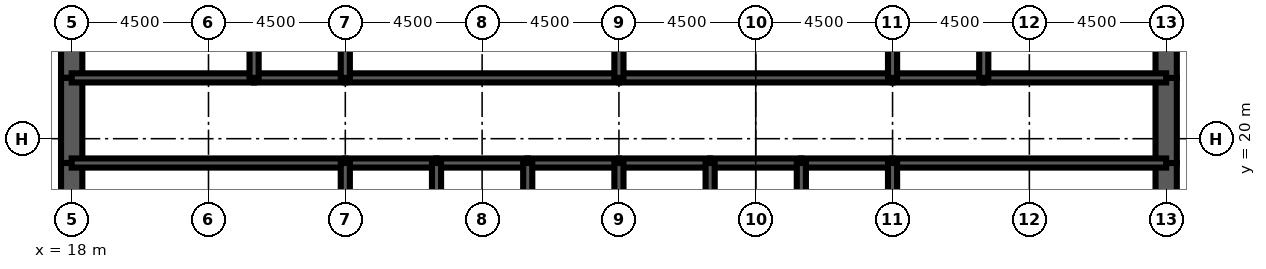
"""IFC4 building model, lengths in metres.
Left out: names, types, materials, properties, quantities, classifications, styles, units other than length and angle.
Written with IfcOpenShell. Run it as: python <this file> out.ifc"""

import sys

from ifc_helpers import new_model, si_unit, direction, frame, frame_2d, origin, place, context, subcontext, project, spatial, rectangle, extrude, element, fill, save


model = new_model("IFC4")
c1 = context("Model", 3, precision=1e-05, world=origin(), true_north=direction((0.0, 1.0)))
c2 = subcontext(c1, "Body", "Model", "MODEL_VIEW")
j1 = project(units=[si_unit("LENGTHUNIT", "METRE"), si_unit("PLANEANGLEUNIT", "RADIAN")], contexts=[c1])
p1 = place(None, origin())
s1 = spatial("IfcSite", under=j1, at=p1, CompositionType="ELEMENT")
p2 = place(p1, origin())
s2 = spatial("IfcBuilding", under=s1, at=p2, CompositionType="ELEMENT")
p3 = place(p2, frame((0.0, 0.0, 329.9)))
s3 = spatial("IfcBuildingStorey", under=s2, at=p3, CompositionType="ELEMENT", Elevation=329.9)
p4 = place(p3, frame((18.0, 26.0, 0.0), z_axis=(0.0, 0.0, 1.0), x_axis=(0.0, -1.0, 0.0)))
e1 = element("IfcWall", 1, at=p4, inside=s3, PredefinedType="SHEAR", context=c2, shape_type="SweptSolid", body=[
    extrude(rectangle(XDim=4.0, YDim=0.7, at=frame_2d((2.0, 0.0))), origin(), (0.0, 0.0, 1.0), 4.2),
])
p5 = place(p3, frame((18.0, 22.0, 0.0), z_axis=(0.0, 0.0, 1.0), x_axis=(0.0, -1.0, 0.0)))
e2 = element("IfcWall", 2, at=p5, inside=s3, PredefinedType="SHEAR", context=c2, shape_type="SweptSolid", body=[
    extrude(rectangle(XDim=2.8, YDim=0.7, at=frame_2d((1.4, 0.0))), origin(), (0.0, 0.0, 1.0), 4.2),
])
p6 = place(p5, frame((0.6, 0.0, 0.0)))
e3 = element("IfcOpeningElement", 3, at=p6, cuts=e2, PredefinedType="OPENING", context=c2, shape_type="SweptSolid", body=[
    extrude(rectangle(XDim=1.8, YDim=2.1, at=frame_2d((0.9, 1.05))), frame((0.0, 0.36, 0.0), z_axis=(0.0, -1.0, 0.0), x_axis=(1.0, 0.0, 0.0)), (0.0, 0.0, 1.0), 0.72),
])
for number, where, z_axis, x_axis in (
    (4, (18.0, 19.2, 0.0), (0.0, 0.0, 1.0), (0.0, -1.0, 0.0)),
    (5, (54.0, 16.0, 0.0), (0.0, 0.0, 1.0), (0.0, 1.0, 0.0)),
):
    element("IfcWall", number, at=place(p3, frame(where, z_axis=z_axis, x_axis=x_axis)), inside=s3, PredefinedType="SHEAR", context=c2, shape_type="SweptSolid", body=[
        extrude(rectangle(XDim=3.2, YDim=0.7, at=frame_2d((1.6, 0.0))), origin(), (0.0, 0.0, 1.0), 4.2),
    ])
p7 = place(p3, frame((54.0, 19.2, 0.0), z_axis=(0.0, 0.0, 1.0), x_axis=(0.0, 1.0, 0.0)))
e6 = element("IfcWall", 6, at=p7, inside=s3, PredefinedType="SHEAR", context=c2, shape_type="SweptSolid", body=[
    extrude(rectangle(XDim=2.8, YDim=0.7, at=frame_2d((1.4, 0.0))), origin(), (0.0, 0.0, 1.0), 4.2),
])
p8 = place(p7, frame((0.4, 0.0, 0.0)))
e7 = element("IfcOpeningElement", 7, at=p8, cuts=e6, PredefinedType="OPENING", context=c2, shape_type="SweptSolid", body=[
    extrude(rectangle(XDim=1.8, YDim=2.1, at=frame_2d((0.9, 1.05))), frame((0.0, 0.36, 0.0), z_axis=(0.0, -1.0, 0.0), x_axis=(1.0, 0.0, 0.0)), (0.0, 0.0, 1.0), 0.72),
])
p9 = place(p3, frame((54.0, 22.0, 0.0), z_axis=(0.0, 0.0, 1.0), x_axis=(0.0, 1.0, 0.0)))
e8 = element("IfcWall", 8, at=p9, inside=s3, PredefinedType="SHEAR", context=c2, shape_type="SweptSolid", body=[
    extrude(rectangle(XDim=4.0, YDim=0.7, at=frame_2d((2.0, 0.0))), origin(), (0.0, 0.0, 1.0), 4.2),
])
p10 = place(p3, frame((18.0, 19.2, 0.0), z_axis=(0.0, 0.0, 1.0), x_axis=(1.0, 0.0, 0.0)))
e9 = element("IfcWall", 9, at=p10, inside=s3, PredefinedType="SOLIDWALL", context=c2, shape_type="SweptSolid", body=[
    extrude(rectangle(XDim=9.0, YDim=0.3, at=frame_2d((4.5, 0.0))), origin(), (0.0, 0.0, 1.0), 4.2),
])
p11 = place(p10, frame((0.65, 0.0, 0.0)))
e10 = element("IfcOpeningElement", 10, at=p11, cuts=e9, PredefinedType="OPENING", context=c2, shape_type="SweptSolid", body=[
    extrude(rectangle(XDim=1.0, YDim=2.1, at=frame_2d((0.5, 1.05))), frame((0.0, 0.16, 0.0), z_axis=(0.0, -1.0, 0.0), x_axis=(1.0, 0.0, 0.0)), (0.0, 0.0, 1.0), 0.32),
])
p12 = place(p3, frame((27.0, 19.2, 0.0), z_axis=(0.0, 0.0, 1.0), x_axis=(1.0, 0.0, 0.0)))
e11 = element("IfcWall", 11, at=p12, inside=s3, PredefinedType="SOLIDWALL", context=c2, shape_type="SweptSolid", body=[
    extrude(rectangle(XDim=3.0, YDim=0.3, at=frame_2d((1.5, 0.0))), origin(), (0.0, 0.0, 1.0), 4.2),
])
p13 = place(p12, frame((0.95, 0.0, 0.0)))
e12 = element("IfcOpeningElement", 12, at=p13, cuts=e11, PredefinedType="OPENING", context=c2, shape_type="SweptSolid", body=[
    extrude(rectangle(XDim=1.1, YDim=2.2, at=frame_2d((0.55, 1.1))), frame((0.0, 0.16, 0.0), z_axis=(0.0, -1.0, 0.0), x_axis=(1.0, 0.0, 0.0)), (0.0, 0.0, 1.0), 0.32),
])
p14 = place(p3, frame((30.0, 19.2, 0.0), z_axis=(0.0, 0.0, 1.0), x_axis=(1.0, 0.0, 0.0)))
e13 = element("IfcWall", 13, at=p14, inside=s3, PredefinedType="SOLIDWALL", context=c2, shape_type="SweptSolid", body=[
    extrude(rectangle(XDim=3.0, YDim=0.3, at=frame_2d((1.5, 0.0))), origin(), (0.0, 0.0, 1.0), 4.2),
])
p15 = place(p14, frame((0.95, 0.0, 0.0)))
e14 = element("IfcOpeningElement", 14, at=p15, cuts=e13, PredefinedType="OPENING", context=c2, shape_type="SweptSolid", body=[
    extrude(rectangle(XDim=1.1, YDim=2.2, at=frame_2d((0.55, 1.1))), frame((0.0, 0.16, 0.0), z_axis=(0.0, -1.0, 0.0), x_axis=(1.0, 0.0, 0.0)), (0.0, 0.0, 1.0), 0.32),
])
p16 = place(p3, frame((33.0, 19.2, 0.0), z_axis=(0.0, 0.0, 1.0), x_axis=(1.0, 0.0, 0.0)))
e15 = element("IfcWall", 15, at=p16, inside=s3, PredefinedType="SOLIDWALL", context=c2, shape_type="SweptSolid", body=[
    extrude(rectangle(XDim=3.0, YDim=0.3, at=frame_2d((1.5, 0.0))), origin(), (0.0, 0.0, 1.0), 4.2),
])
p17 = place(p16, frame((0.95, 0.0, 0.0)))
e16 = element("IfcOpeningElement", 16, at=p17, cuts=e15, PredefinedType="OPENING", context=c2, shape_type="SweptSolid", body=[
    extrude(rectangle(XDim=1.1, YDim=2.2, at=frame_2d((0.55, 1.1))), frame((0.0, 0.16, 0.0), z_axis=(0.0, -1.0, 0.0), x_axis=(1.0, 0.0, 0.0)), (0.0, 0.0, 1.0), 0.32),
])
p18 = place(p3, frame((36.0, 19.2, 0.0), z_axis=(0.0, 0.0, 1.0), x_axis=(1.0, 0.0, 0.0)))
e17 = element("IfcWall", 17, at=p18, inside=s3, PredefinedType="SOLIDWALL", context=c2, shape_type="SweptSolid", body=[
    extrude(rectangle(XDim=3.0, YDim=0.3, at=frame_2d((1.5, 0.0))), origin(), (0.0, 0.0, 1.0), 4.2),
])
p19 = place(p18, frame((0.95, 0.0, 0.0)))
e18 = element("IfcOpeningElement", 18, at=p19, cuts=e17, PredefinedType="OPENING", context=c2, shape_type="SweptSolid", body=[
    extrude(rectangle(XDim=1.1, YDim=2.2, at=frame_2d((0.55, 1.1))), frame((0.0, 0.16, 0.0), z_axis=(0.0, -1.0, 0.0), x_axis=(1.0, 0.0, 0.0)), (0.0, 0.0, 1.0), 0.32),
])
p20 = place(p3, frame((39.0, 19.2, 0.0), z_axis=(0.0, 0.0, 1.0), x_axis=(1.0, 0.0, 0.0)))
e19 = element("IfcWall", 19, at=p20, inside=s3, PredefinedType="SOLIDWALL", context=c2, shape_type="SweptSolid", body=[
    extrude(rectangle(XDim=3.0, YDim=0.3, at=frame_2d((1.5, 0.0))), origin(), (0.0, 0.0, 1.0), 4.2),
])
p21 = place(p20, frame((1.0, 0.0, 0.0)))
e20 = element("IfcOpeningElement", 20, at=p21, cuts=e19, PredefinedType="OPENING", context=c2, shape_type="SweptSolid", body=[
    extrude(rectangle(XDim=1.0, YDim=2.1, at=frame_2d((0.5, 1.05))), frame((0.0, 0.16, 0.0), z_axis=(0.0, -1.0, 0.0), x_axis=(1.0, 0.0, 0.0)), (0.0, 0.0, 1.0), 0.32),
])
p22 = place(p3, frame((42.0, 19.2, 0.0), z_axis=(0.0, 0.0, 1.0), x_axis=(1.0, 0.0, 0.0)))
e21 = element("IfcWall", 21, at=p22, inside=s3, PredefinedType="SOLIDWALL", context=c2, shape_type="SweptSolid", body=[
    extrude(rectangle(XDim=3.0, YDim=0.3, at=frame_2d((1.5, 0.0))), origin(), (0.0, 0.0, 1.0), 4.2),
])
p23 = place(p22, frame((1.0, 0.0, 0.0)))
e22 = element("IfcOpeningElement", 22, at=p23, cuts=e21, PredefinedType="OPENING", context=c2, shape_type="SweptSolid", body=[
    extrude(rectangle(XDim=1.0, YDim=2.1, at=frame_2d((0.5, 1.05))), frame((0.0, 0.16, 0.0), z_axis=(0.0, -1.0, 0.0), x_axis=(1.0, 0.0, 0.0)), (0.0, 0.0, 1.0), 0.32),
])
p24 = place(p3, frame((45.0, 19.2, 0.0), z_axis=(0.0, 0.0, 1.0), x_axis=(1.0, 0.0, 0.0)))
e23 = element("IfcWall", 23, at=p24, inside=s3, PredefinedType="SOLIDWALL", context=c2, shape_type="SweptSolid", body=[
    extrude(rectangle(XDim=9.0, YDim=0.3, at=frame_2d((4.5, 0.0))), origin(), (0.0, 0.0, 1.0), 4.2),
])
p25 = place(p24, frame((7.35, 0.0, 0.0)))
e24 = element("IfcOpeningElement", 24, at=p25, cuts=e23, PredefinedType="OPENING", context=c2, shape_type="SweptSolid", body=[
    extrude(rectangle(XDim=1.0, YDim=2.1, at=frame_2d((0.5, 1.05))), frame((0.0, 0.16, 0.0), z_axis=(0.0, -1.0, 0.0), x_axis=(1.0, 0.0, 0.0)), (0.0, 0.0, 1.0), 0.32),
])
p26 = place(p3, frame((18.0, 22.0, 0.0), z_axis=(0.0, 0.0, 1.0), x_axis=(1.0, 0.0, 0.0)))
e25 = element("IfcWall", 25, at=p26, inside=s3, PredefinedType="SOLIDWALL", context=c2, shape_type="SweptSolid", body=[
    extrude(rectangle(XDim=6.0, YDim=0.3, at=frame_2d((3.0, 0.0))), origin(), (0.0, 0.0, 1.0), 4.2),
])
p27 = place(p26, frame((4.4, 0.0, 0.0)))
e26 = element("IfcOpeningElement", 26, at=p27, cuts=e25, PredefinedType="OPENING", context=c2, shape_type="SweptSolid", body=[
    extrude(rectangle(XDim=1.0, YDim=2.1, at=frame_2d((0.5, 1.05))), frame((0.0, 0.16, 0.0), z_axis=(0.0, -1.0, 0.0), x_axis=(1.0, 0.0, 0.0)), (0.0, 0.0, 1.0), 0.32),
])
p28 = place(p26, frame((0.9, 0.0, 0.0)))
e27 = element("IfcOpeningElement", 27, at=p28, cuts=e25, PredefinedType="OPENING", context=c2, shape_type="SweptSolid", body=[
    extrude(rectangle(XDim=1.0, YDim=2.1, at=frame_2d((0.5, 1.05))), frame((0.0, 0.16, 0.0), z_axis=(0.0, -1.0, 0.0), x_axis=(1.0, 0.0, 0.0)), (0.0, 0.0, 1.0), 0.32),
])
p29 = place(p3, frame((24.0, 22.0, 0.0), z_axis=(0.0, 0.0, 1.0), x_axis=(1.0, 0.0, 0.0)))
e28 = element("IfcWall", 28, at=p29, inside=s3, PredefinedType="SOLIDWALL", context=c2, shape_type="SweptSolid", body=[
    extrude(rectangle(XDim=3.0, YDim=0.3, at=frame_2d((1.5, 0.0))), origin(), (0.0, 0.0, 1.0), 4.2),
])
p30 = place(p29, frame((1.0, 0.0, 0.0)))
e29 = element("IfcOpeningElement", 29, at=p30, cuts=e28, PredefinedType="OPENING", context=c2, shape_type="SweptSolid", body=[
    extrude(rectangle(XDim=1.0, YDim=2.1, at=frame_2d((0.5, 1.05))), frame((0.0, 0.16, 0.0), z_axis=(0.0, -1.0, 0.0), x_axis=(1.0, 0.0, 0.0)), (0.0, 0.0, 1.0), 0.32),
])
p31 = place(p3, frame((27.0, 22.0, 0.0), z_axis=(0.0, 0.0, 1.0), x_axis=(1.0, 0.0, 0.0)))
e30 = element("IfcWall", 30, at=p31, inside=s3, PredefinedType="SOLIDWALL", context=c2, shape_type="SweptSolid", body=[
    extrude(rectangle(XDim=9.0, YDim=0.3, at=frame_2d((4.5, 0.0))), origin(), (0.0, 0.0, 1.0), 4.2),
])
p32 = place(p31, frame((4.0, 0.0, 0.0)))
e31 = element("IfcOpeningElement", 31, at=p32, cuts=e30, PredefinedType="OPENING", context=c2, shape_type="SweptSolid", body=[
    extrude(rectangle(XDim=1.0, YDim=2.1, at=frame_2d((0.5, 1.05))), frame((0.0, 0.16, 0.0), z_axis=(0.0, -1.0, 0.0), x_axis=(1.0, 0.0, 0.0)), (0.0, 0.0, 1.0), 0.32),
])
p33 = place(p3, frame((36.0, 22.0, 0.0), z_axis=(0.0, 0.0, 1.0), x_axis=(1.0, 0.0, 0.0)))
e32 = element("IfcWall", 32, at=p33, inside=s3, PredefinedType="SOLIDWALL", context=c2, shape_type="SweptSolid", body=[
    extrude(rectangle(XDim=9.0, YDim=0.3, at=frame_2d((4.5, 0.0))), origin(), (0.0, 0.0, 1.0), 4.2),
])
p34 = place(p33, frame((4.0, 0.0, 0.0)))
e33 = element("IfcOpeningElement", 33, at=p34, cuts=e32, PredefinedType="OPENING", context=c2, shape_type="SweptSolid", body=[
    extrude(rectangle(XDim=1.0, YDim=2.1, at=frame_2d((0.5, 1.05))), frame((0.0, 0.16, 0.0), z_axis=(0.0, -1.0, 0.0), x_axis=(1.0, 0.0, 0.0)), (0.0, 0.0, 1.0), 0.32),
])
p35 = place(p3, frame((45.0, 22.0, 0.0), z_axis=(0.0, 0.0, 1.0), x_axis=(1.0, 0.0, 0.0)))
e34 = element("IfcWall", 34, at=p35, inside=s3, PredefinedType="SOLIDWALL", context=c2, shape_type="SweptSolid", body=[
    extrude(rectangle(XDim=3.0, YDim=0.3, at=frame_2d((1.5, 0.0))), origin(), (0.0, 0.0, 1.0), 4.2),
])
p36 = place(p35, frame((1.0, 0.0, 0.0)))
e35 = element("IfcOpeningElement", 35, at=p36, cuts=e34, PredefinedType="OPENING", context=c2, shape_type="SweptSolid", body=[
    extrude(rectangle(XDim=1.0, YDim=2.1, at=frame_2d((0.5, 1.05))), frame((0.0, 0.16, 0.0), z_axis=(0.0, -1.0, 0.0), x_axis=(1.0, 0.0, 0.0)), (0.0, 0.0, 1.0), 0.32),
])
p37 = place(p3, frame((48.0, 22.0, 0.0), z_axis=(0.0, 0.0, 1.0), x_axis=(1.0, 0.0, 0.0)))
e36 = element("IfcWall", 36, at=p37, inside=s3, PredefinedType="SOLIDWALL", context=c2, shape_type="SweptSolid", body=[
    extrude(rectangle(XDim=6.0, YDim=0.3, at=frame_2d((3.0, 0.0))), origin(), (0.0, 0.0, 1.0), 4.2),
])
p38 = place(p37, frame((2.0, 0.0, 0.0)))
e37 = element("IfcOpeningElement", 37, at=p38, cuts=e36, PredefinedType="OPENING", context=c2, shape_type="SweptSolid", body=[
    extrude(rectangle(XDim=1.0, YDim=2.1, at=frame_2d((0.5, 1.05))), frame((0.0, 0.16, 0.0), z_axis=(0.0, -1.0, 0.0), x_axis=(1.0, 0.0, 0.0)), (0.0, 0.0, 1.0), 0.32),
])
p39 = place(p37, frame((4.4, 0.0, 0.0)))
e38 = element("IfcOpeningElement", 38, at=p39, cuts=e36, PredefinedType="OPENING", context=c2, shape_type="SweptSolid", body=[
    extrude(rectangle(XDim=1.0, YDim=2.1, at=frame_2d((0.5, 1.05))), frame((0.0, 0.16, 0.0), z_axis=(0.0, -1.0, 0.0), x_axis=(1.0, 0.0, 0.0)), (0.0, 0.0, 1.0), 0.32),
])
for number, where, z_axis, x_axis in (
    (39, (27.0, 16.0, 0.0), (0.0, 0.0, 1.0), (0.0, 1.0, 0.0)),
    (40, (30.0, 16.0, 0.0), (0.0, 0.0, 1.0), (0.0, 1.0, 0.0)),
    (41, (33.0, 16.0, 0.0), (0.0, 0.0, 1.0), (0.0, 1.0, 0.0)),
    (42, (36.0, 16.0, 0.0), (0.0, 0.0, 1.0), (0.0, 1.0, 0.0)),
    (43, (39.0, 16.0, 0.0), (0.0, 0.0, 1.0), (0.0, 1.0, 0.0)),
    (44, (42.0, 16.0, 0.0), (0.0, 0.0, 1.0), (0.0, 1.0, 0.0)),
    (45, (45.0, 16.0, 0.0), (0.0, 0.0, 1.0), (0.0, 1.0, 0.0)),
):
    element("IfcWall", number, at=place(p3, frame(where, z_axis=z_axis, x_axis=x_axis)), inside=s3, PredefinedType="SOLIDWALL", context=c2, shape_type="SweptSolid", body=[
        extrude(rectangle(XDim=3.2, YDim=0.3, at=frame_2d((1.6, 0.0))), origin(), (0.0, 0.0, 1.0), 4.2),
    ])
for number, where, z_axis, x_axis in (
    (46, (24.0, 22.0, 0.0), (0.0, 0.0, 1.0), (0.0, 1.0, 0.0)),
    (47, (27.0, 22.0, 0.0), (0.0, 0.0, 1.0), (0.0, 1.0, 0.0)),
    (48, (36.0, 22.0, 0.0), (0.0, 0.0, 1.0), (0.0, 1.0, 0.0)),
    (49, (45.0, 22.0, 0.0), (0.0, 0.0, 1.0), (0.0, 1.0, 0.0)),
    (50, (48.0, 22.0, 0.0), (0.0, 0.0, 1.0), (0.0, 1.0, 0.0)),
):
    element("IfcWall", number, at=place(p3, frame(where, z_axis=z_axis, x_axis=x_axis)), inside=s3, PredefinedType="SOLIDWALL", context=c2, shape_type="SweptSolid", body=[
        extrude(rectangle(XDim=4.0, YDim=0.3, at=frame_2d((2.0, 0.0))), origin(), (0.0, 0.0, 1.0), 4.2),
    ])
p40 = place(p3, frame((42.5, 22.15, 0.0), z_axis=(0.0, 0.0, 1.0), x_axis=(0.0, 1.0, 0.0)))
e51 = element("IfcWall", 51, at=p40, inside=s3, PredefinedType="PARTITIONING", context=c2, shape_type="SweptSolid", body=[
    extrude(rectangle(XDim=3.7, YDim=0.15, at=frame_2d((1.85, 0.0))), origin(), (0.0, 0.0, 1.0), 3.0),
])
p41 = place(p40, frame((2.2, 0.0, 0.0)))
e52 = element("IfcOpeningElement", 52, at=p41, cuts=e51, PredefinedType="OPENING", context=c2, shape_type="SweptSolid", body=[
    extrude(rectangle(XDim=1.0, YDim=2.1, at=frame_2d((0.5, 1.05))), frame((0.0, 0.085, 0.0), z_axis=(0.0, -1.0, 0.0), x_axis=(1.0, 0.0, 0.0)), (0.0, 0.0, 1.0), 0.17),
])
for number, where, z_axis, x_axis in (
    (53, (20.525, 22.15, 0.0), (0.0, 0.0, 1.0), (0.0, 1.0, 0.0)),
    (54, (52.075, 22.15, 0.0), (0.0, 0.0, 1.0), (0.0, 1.0, 0.0)),
):
    element("IfcWall", number, at=place(p3, frame(where, z_axis=z_axis, x_axis=x_axis)), inside=s3, PredefinedType="PARTITIONING", context=c2, shape_type="SweptSolid", body=[
        extrude(rectangle(XDim=3.7, YDim=0.15, at=frame_2d((1.85, 0.0))), origin(), (0.0, 0.0, 1.0), 3.0),
    ])
p42 = place(p13, origin())
e55 = element("IfcDoor", 55, at=p42, inside=s3, OperationType="DOUBLE_DOOR_SLIDING", PredefinedType="USERDEFINED", context=c2, shape_type="SweptSolid", body=[
    extrude(rectangle(XDim=1.1, YDim=2.2, at=frame_2d((0.55, 1.1))), frame((0.0, 0.025, 0.0), z_axis=(0.0, -1.0, 0.0), x_axis=(1.0, 0.0, 0.0)), (0.0, 0.0, 1.0), 0.05),
])
fill(e12, e55)
p43 = place(p15, origin())
e56 = element("IfcDoor", 56, at=p43, inside=s3, OperationType="DOUBLE_DOOR_SLIDING", PredefinedType="USERDEFINED", context=c2, shape_type="SweptSolid", body=[
    extrude(rectangle(XDim=1.1, YDim=2.2, at=frame_2d((0.55, 1.1))), frame((0.0, 0.025, 0.0), z_axis=(0.0, -1.0, 0.0), x_axis=(1.0, 0.0, 0.0)), (0.0, 0.0, 1.0), 0.05),
])
fill(e14, e56)
p44 = place(p17, origin())
e57 = element("IfcDoor", 57, at=p44, inside=s3, OperationType="DOUBLE_DOOR_SLIDING", PredefinedType="USERDEFINED", context=c2, shape_type="SweptSolid", body=[
    extrude(rectangle(XDim=1.1, YDim=2.2, at=frame_2d((0.55, 1.1))), frame((0.0, 0.025, 0.0), z_axis=(0.0, -1.0, 0.0), x_axis=(1.0, 0.0, 0.0)), (0.0, 0.0, 1.0), 0.05),
])
fill(e16, e57)
p45 = place(p19, origin())
e58 = element("IfcDoor", 58, at=p45, inside=s3, OperationType="DOUBLE_DOOR_SLIDING", PredefinedType="USERDEFINED", context=c2, shape_type="SweptSolid", body=[
    extrude(rectangle(XDim=1.1, YDim=2.2, at=frame_2d((0.55, 1.1))), frame((0.0, 0.025, 0.0), z_axis=(0.0, -1.0, 0.0), x_axis=(1.0, 0.0, 0.0)), (0.0, 0.0, 1.0), 0.05),
])
fill(e18, e58)
p46 = place(p11, origin())
e59 = element("IfcDoor", 59, at=p46, inside=s3, OperationType="SINGLE_SWING_LEFT", PredefinedType="DOOR", context=c2, shape_type="SweptSolid", body=[
    extrude(rectangle(XDim=1.0, YDim=2.1, at=frame_2d((0.5, 1.05))), frame((0.0, 0.025, 0.0), z_axis=(0.0, -1.0, 0.0), x_axis=(1.0, 0.0, 0.0)), (0.0, 0.0, 1.0), 0.05),
])
fill(e10, e59)
p47 = place(p25, origin())
e60 = element("IfcDoor", 60, at=p47, inside=s3, OperationType="SINGLE_SWING_RIGHT", PredefinedType="DOOR", context=c2, shape_type="SweptSolid", body=[
    extrude(rectangle(XDim=1.0, YDim=2.1, at=frame_2d((0.5, 1.05))), frame((0.0, 0.025, 0.0), z_axis=(0.0, -1.0, 0.0), x_axis=(1.0, 0.0, 0.0)), (0.0, 0.0, 1.0), 0.05),
])
fill(e24, e60)
p48 = place(p6, origin())
e61 = element("IfcDoor", 61, at=p48, inside=s3, OperationType="SINGLE_SWING_LEFT", PredefinedType="DOOR", context=c2, shape_type="SweptSolid", body=[
    extrude(rectangle(XDim=1.8, YDim=2.1, at=frame_2d((0.9, 1.05))), frame((0.0, 0.35, 0.0), z_axis=(0.0, -1.0, 0.0), x_axis=(1.0, 0.0, 0.0)), (0.0, 0.0, 1.0), 0.699),
])
fill(e3, e61)
p49 = place(p8, origin())
e62 = element("IfcDoor", 62, at=p49, inside=s3, OperationType="SINGLE_SWING_LEFT", PredefinedType="DOOR", context=c2, shape_type="SweptSolid", body=[
    extrude(rectangle(XDim=1.8, YDim=2.1, at=frame_2d((0.9, 1.05))), frame((0.0, 0.35, 0.0), z_axis=(0.0, -1.0, 0.0), x_axis=(1.0, 0.0, 0.0)), (0.0, 0.0, 1.0), 0.699),
])
fill(e7, e62)
p50 = place(p27, origin())
e63 = element("IfcDoor", 63, at=p50, inside=s3, OperationType="SINGLE_SWING_RIGHT", PredefinedType="DOOR", context=c2, shape_type="SweptSolid", body=[
    extrude(rectangle(XDim=1.0, YDim=2.1, at=frame_2d((0.5, 1.05))), frame((0.0, 0.025, 0.0), z_axis=(0.0, -1.0, 0.0), x_axis=(1.0, 0.0, 0.0)), (0.0, 0.0, 1.0), 0.05),
])
fill(e26, e63)
p51 = place(p30, origin())
e64 = element("IfcDoor", 64, at=p51, inside=s3, OperationType="SINGLE_SWING_LEFT", PredefinedType="DOOR", context=c2, shape_type="SweptSolid", body=[
    extrude(rectangle(XDim=1.0, YDim=2.1, at=frame_2d((0.5, 1.05))), frame((0.0, 0.025, 0.0), z_axis=(0.0, -1.0, 0.0), x_axis=(1.0, 0.0, 0.0)), (0.0, 0.0, 1.0), 0.05),
])
fill(e29, e64)
p52 = place(p32, origin())
e65 = element("IfcDoor", 65, at=p52, inside=s3, OperationType="SINGLE_SWING_LEFT", PredefinedType="DOOR", context=c2, shape_type="SweptSolid", body=[
    extrude(rectangle(XDim=1.0, YDim=2.1, at=frame_2d((0.5, 1.05))), frame((0.0, 0.025, 0.0), z_axis=(0.0, -1.0, 0.0), x_axis=(1.0, 0.0, 0.0)), (0.0, 0.0, 1.0), 0.05),
])
fill(e31, e65)
p53 = place(p34, origin())
e66 = element("IfcDoor", 66, at=p53, inside=s3, OperationType="SINGLE_SWING_LEFT", PredefinedType="DOOR", context=c2, shape_type="SweptSolid", body=[
    extrude(rectangle(XDim=1.0, YDim=2.1, at=frame_2d((0.5, 1.05))), frame((0.0, 0.025, 0.0), z_axis=(0.0, -1.0, 0.0), x_axis=(1.0, 0.0, 0.0)), (0.0, 0.0, 1.0), 0.05),
])
fill(e33, e66)
p54 = place(p36, origin())
e67 = element("IfcDoor", 67, at=p54, inside=s3, OperationType="SINGLE_SWING_LEFT", PredefinedType="DOOR", context=c2, shape_type="SweptSolid", body=[
    extrude(rectangle(XDim=1.0, YDim=2.1, at=frame_2d((0.5, 1.05))), frame((0.0, 0.025, 0.0), z_axis=(0.0, -1.0, 0.0), x_axis=(1.0, 0.0, 0.0)), (0.0, 0.0, 1.0), 0.05),
])
fill(e35, e67)
p55 = place(p38, origin())
e68 = element("IfcDoor", 68, at=p55, inside=s3, OperationType="SINGLE_SWING_LEFT", PredefinedType="DOOR", context=c2, shape_type="SweptSolid", body=[
    extrude(rectangle(XDim=1.0, YDim=2.1, at=frame_2d((0.5, 1.05))), frame((0.0, 0.025, 0.0), z_axis=(0.0, -1.0, 0.0), x_axis=(1.0, 0.0, 0.0)), (0.0, 0.0, 1.0), 0.05),
])
fill(e37, e68)
p56 = place(p28, origin())
e69 = element("IfcDoor", 69, at=p56, inside=s3, OperationType="SINGLE_SWING_LEFT", PredefinedType="DOOR", context=c2, shape_type="SweptSolid", body=[
    extrude(rectangle(XDim=1.0, YDim=2.1, at=frame_2d((0.5, 1.05))), frame((0.0, 0.025, 0.0), z_axis=(0.0, -1.0, 0.0), x_axis=(1.0, 0.0, 0.0)), (0.0, 0.0, 1.0), 0.05),
])
fill(e27, e69)
p57 = place(p39, origin())
e70 = element("IfcDoor", 70, at=p57, inside=s3, OperationType="SINGLE_SWING_RIGHT", PredefinedType="DOOR", context=c2, shape_type="SweptSolid", body=[
    extrude(rectangle(XDim=1.0, YDim=2.1, at=frame_2d((0.5, 1.05))), frame((0.0, 0.025, 0.0), z_axis=(0.0, -1.0, 0.0), x_axis=(1.0, 0.0, 0.0)), (0.0, 0.0, 1.0), 0.05),
])
fill(e38, e70)
p58 = place(p21, origin())
e71 = element("IfcDoor", 71, at=p58, inside=s3, OperationType="SINGLE_SWING_LEFT", PredefinedType="DOOR", context=c2, shape_type="SweptSolid", body=[
    extrude(rectangle(XDim=1.0, YDim=2.1, at=frame_2d((0.5, 1.05))), frame((0.0, 0.025, 0.0), z_axis=(0.0, -1.0, 0.0), x_axis=(1.0, 0.0, 0.0)), (0.0, 0.0, 1.0), 0.05),
])
fill(e20, e71)
p59 = place(p23, origin())
e72 = element("IfcDoor", 72, at=p59, inside=s3, OperationType="SINGLE_SWING_LEFT", PredefinedType="DOOR", context=c2, shape_type="SweptSolid", body=[
    extrude(rectangle(XDim=1.0, YDim=2.1, at=frame_2d((0.5, 1.05))), frame((0.0, 0.025, 0.0), z_axis=(0.0, -1.0, 0.0), x_axis=(1.0, 0.0, 0.0)), (0.0, 0.0, 1.0), 0.05),
])
fill(e22, e72)
save(model, sys.argv[1])
